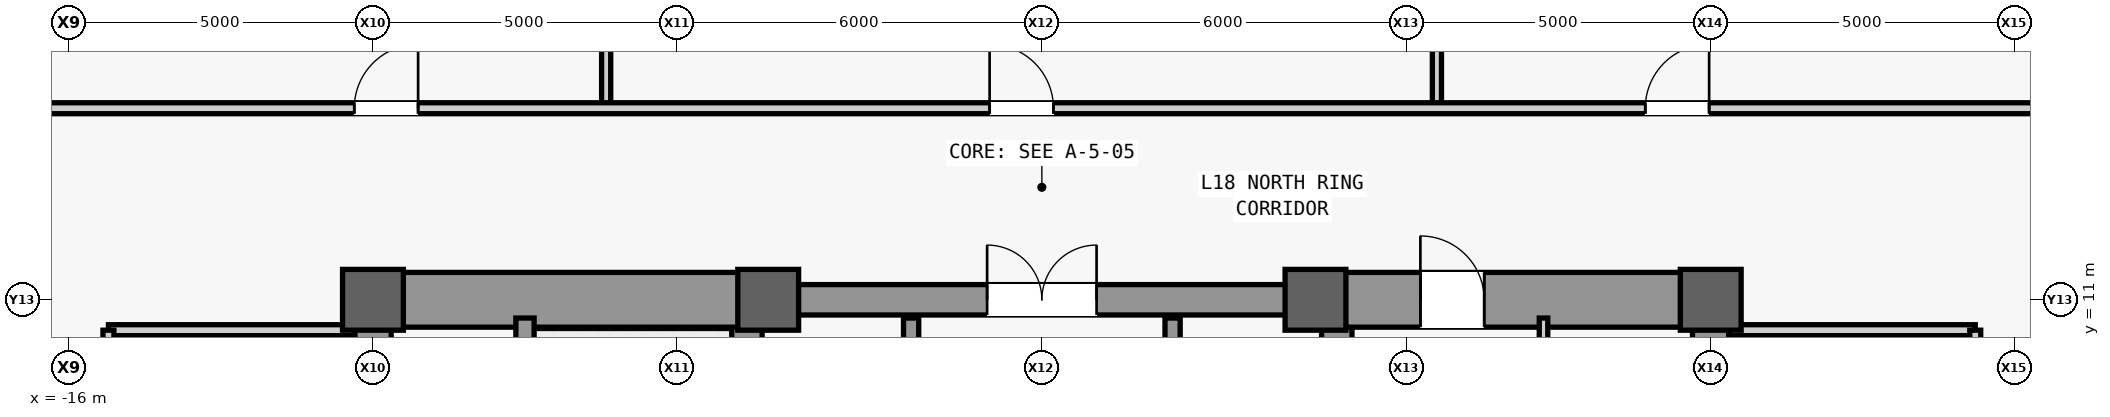
"""IFC4 building model, lengths in metres.
Left out: names, types, materials, properties, quantities, classifications, styles, units other than length and angle.
Written with IfcOpenShell. Run it as: python <this file> out.ifc"""

import sys

from ifc_helpers import new_model, si_unit, direction, frame, frame_2d, origin, origin_2d, place, context, subcontext, project, spatial, rectangle, extrude, source, transform, mapped, element, fill, save


model = new_model("IFC4")
c1 = context("Model", 3, precision=1e-05, world=origin(), true_north=direction((0.0, 1.0)))
c2 = subcontext(c1, "Body", "Model", "MODEL_VIEW")
j1 = project(units=[si_unit("LENGTHUNIT", "METRE"), si_unit("PLANEANGLEUNIT", "RADIAN")], contexts=[c1])
p1 = place(None, origin())
s1 = spatial("IfcSite", under=j1, at=p1, CompositionType="ELEMENT")
p2 = place(p1, origin())
s2 = spatial("IfcBuilding", under=s1, at=p2, CompositionType="ELEMENT")
p3 = place(p2, frame((0.0, 0.0, 83.0)))
s3 = spatial("IfcBuildingStorey", under=s2, at=p3, CompositionType="ELEMENT", Elevation=83.0)
m1 = source(origin(), c2, "Body", "SweptSolid", [
    extrude(rectangle(XDim=22.0, YDim=0.6, at=frame_2d((11.0, 0.0))), origin(), (0.0, 0.0, 1.0), 3.94),
])
p4 = place(p3, frame((-11.0, -11.0, 0.0), z_axis=(0.0, 0.0, 1.0), x_axis=(0.0, 1.0, 0.0)))
e1 = element("IfcWall", 1, at=p4, inside=s3, PredefinedType="SHEAR", context=c2, shape_type="MappedRepresentation", body=[
    mapped(m1, transform((0.0, 0.0, 0.0), scale=1.0)),
])
m2 = source(origin(), c2, "Body", "SweptSolid", [
    extrude(rectangle(XDim=1.1, YDim=2.2, at=frame_2d((0.55, 1.1))), frame((0.0, 0.31, 0.0), z_axis=(0.0, -1.0, 0.0), x_axis=(1.0, 0.0, 0.0)), (0.0, 0.0, 1.0), 0.62),
])
p5 = place(p4, frame((0.8, 0.0, 0.0)))
e2 = element("IfcOpeningElement", 2, at=p5, cuts=e1, PredefinedType="OPENING", context=c2, shape_type="MappedRepresentation", body=[
    mapped(m2, transform((0.0, 0.0, 0.0), scale=1.0)),
])
p6 = place(p4, frame((12.5, 0.0, 0.0)))
e3 = element("IfcOpeningElement", 3, at=p6, cuts=e1, PredefinedType="OPENING", context=c2, shape_type="MappedRepresentation", body=[
    mapped(m2, transform((0.0, 0.0, 0.0), scale=1.0)),
])
m3 = source(origin(), c2, "Body", "SweptSolid", [
    extrude(rectangle(XDim=0.9, YDim=2.15, at=frame_2d((0.45, 1.075))), frame((0.0, 0.31, 0.0), z_axis=(0.0, -1.0, 0.0), x_axis=(1.0, 0.0, 0.0)), (0.0, 0.0, 1.0), 0.62),
])
p7 = place(p4, frame((6.85, 0.0, 0.0)))
e4 = element("IfcOpeningElement", 4, at=p7, cuts=e1, PredefinedType="OPENING", context=c2, shape_type="MappedRepresentation", body=[
    mapped(m3, transform((0.0, 0.0, 0.0), scale=1.0)),
])
m4 = source(origin(), c2, "Body", "SweptSolid", [
    extrude(rectangle(XDim=1.3, YDim=2.3, at=frame_2d((0.65, 1.15))), frame((0.0, 0.31, 0.0), z_axis=(0.0, -1.0, 0.0), x_axis=(1.0, 0.0, 0.0)), (0.0, 0.0, 1.0), 0.62),
])
p8 = place(p4, frame((2.7, 0.0, 0.0)))
e5 = element("IfcOpeningElement", 5, at=p8, cuts=e1, PredefinedType="OPENING", context=c2, shape_type="MappedRepresentation", body=[
    mapped(m4, transform((0.0, 0.0, 0.0), scale=1.0)),
])
p9 = place(p3, frame((11.0, -11.0, 0.0), z_axis=(0.0, 0.0, 1.0), x_axis=(0.0, 1.0, 0.0)))
e6 = element("IfcWall", 6, at=p9, inside=s3, PredefinedType="SHEAR", context=c2, shape_type="MappedRepresentation", body=[
    mapped(m1, transform((0.0, 0.0, 0.0), scale=1.0)),
])
p10 = place(p9, frame((0.8, 0.0, 0.0)))
e7 = element("IfcOpeningElement", 7, at=p10, cuts=e6, PredefinedType="OPENING", context=c2, shape_type="MappedRepresentation", body=[
    mapped(m2, transform((0.0, 0.0, 0.0), scale=1.0)),
])
p11 = place(p9, frame((6.2, 0.0, 0.0)))
e8 = element("IfcOpeningElement", 8, at=p11, cuts=e6, PredefinedType="OPENING", context=c2, shape_type="MappedRepresentation", body=[
    mapped(m3, transform((0.0, 0.0, 0.0), scale=1.0)),
])
p12 = place(p9, frame((8.05, 0.0, 0.0)))
e9 = element("IfcOpeningElement", 9, at=p12, cuts=e6, PredefinedType="OPENING", context=c2, shape_type="MappedRepresentation", body=[
    mapped(m3, transform((0.0, 0.0, 0.0), scale=1.0)),
])
p13 = place(p9, frame((2.7, 0.0, 0.0)))
e10 = element("IfcOpeningElement", 10, at=p13, cuts=e6, PredefinedType="OPENING", context=c2, shape_type="MappedRepresentation", body=[
    mapped(m4, transform((0.0, 0.0, 0.0), scale=1.0)),
])
p14 = place(p9, frame((13.35, 0.0, 0.0)))
e11 = element("IfcOpeningElement", 11, at=p14, cuts=e6, PredefinedType="OPENING", context=c2, shape_type="MappedRepresentation", body=[
    mapped(m4, transform((0.0, 0.0, 0.0), scale=1.0)),
])
m5 = source(origin(), c2, "Body", "SweptSolid", [
    extrude(rectangle(XDim=21.4, YDim=0.5, at=frame_2d((10.7, 0.0))), origin(), (0.0, 0.0, 1.0), 3.94),
])
for number, where, z_axis, x_axis in (
    (12, (-4.85, -10.7, 0.0), (0.0, 0.0, 1.0), (0.0, 1.0, 0.0)),
    (13, (4.85, -10.7, 0.0), (0.0, 0.0, 1.0), (0.0, 1.0, 0.0)),
):
    element("IfcWall", number, at=place(p3, frame(where, z_axis=z_axis, x_axis=x_axis)), inside=s3, PredefinedType="SHEAR", context=c2, shape_type="MappedRepresentation", body=[
        mapped(m5, transform((0.0, 0.0, 0.0), scale=1.0)),
    ])
m6 = source(origin(), c2, "Body", "SweptSolid", [
    extrude(rectangle(XDim=5.85, YDim=0.9, at=frame_2d((2.925, 0.0))), origin(), (0.0, 0.0, 1.0), 3.94),
])
p15 = place(p3, frame((-10.7, 11.0, 0.0), z_axis=(0.0, 0.0, 1.0), x_axis=(1.0, 0.0, 0.0)))
e14 = element("IfcWall", 14, at=p15, inside=s3, PredefinedType="SHEAR", context=c2, shape_type="MappedRepresentation", body=[
    mapped(m6, transform((0.0, 0.0, 0.0), scale=1.0)),
])
p16 = place(p3, frame((4.85, 11.0, 0.0), z_axis=(0.0, 0.0, 1.0), x_axis=(1.0, 0.0, 0.0)))
e15 = element("IfcWall", 15, at=p16, inside=s3, PredefinedType="SHEAR", context=c2, shape_type="MappedRepresentation", body=[
    mapped(m6, transform((0.0, 0.0, 0.0), scale=1.0)),
])
m7 = source(origin(), c2, "Body", "SweptSolid", [
    extrude(rectangle(XDim=1.05, YDim=2.2, at=frame_2d((0.525, 1.1))), frame((0.0, 0.46, 0.0), z_axis=(0.0, -1.0, 0.0), x_axis=(1.0, 0.0, 0.0)), (0.0, 0.0, 1.0), 0.92),
])
p17 = place(p16, frame((1.375, 0.0, 0.0)))
e16 = element("IfcOpeningElement", 16, at=p17, cuts=e15, PredefinedType="OPENING", context=c2, shape_type="MappedRepresentation", body=[
    mapped(m7, transform((0.0, 0.0, 0.0), scale=1.0)),
])
m8 = source(origin(), c2, "Body", "SweptSolid", [
    extrude(rectangle(XDim=9.2, YDim=0.5, at=frame_2d((4.6, 0.0))), origin(), (0.0, 0.0, 1.0), 3.94),
])
p18 = place(p3, frame((-4.6, 11.0, 0.0), z_axis=(0.0, 0.0, 1.0), x_axis=(1.0, 0.0, 0.0)))
e17 = element("IfcWall", 17, at=p18, inside=s3, PredefinedType="SHEAR", context=c2, shape_type="MappedRepresentation", body=[
    mapped(m8, transform((0.0, 0.0, 0.0), scale=1.0)),
])
m9 = source(origin(), c2, "Body", "SweptSolid", [
    extrude(rectangle(XDim=1.8, YDim=2.25, at=frame_2d((0.9, 1.125))), frame((0.0, 0.26, 0.0), z_axis=(0.0, -1.0, 0.0), x_axis=(1.0, 0.0, 0.0)), (0.0, 0.0, 1.0), 0.52),
])
p19 = place(p18, frame((3.7, 0.0, 0.0)))
e18 = element("IfcOpeningElement", 18, at=p19, cuts=e17, PredefinedType="OPENING", context=c2, shape_type="MappedRepresentation", body=[
    mapped(m9, transform((0.0, 0.0, 0.0), scale=1.0)),
])
m10 = source(origin(), c2, "Body", "SweptSolid", [
    extrude(rectangle(XDim=1.0, YDim=1.0, at=origin_2d()), origin(), (0.0, 0.0, 1.0), 4.2),
])
for number, where, z_axis, x_axis in (
    (19, (-11.0, 11.0, 0.0), (0.0, 0.0, 1.0), (1.0, 0.0, 0.0)),
    (20, (-4.5, 11.0, 0.0), (0.0, 0.0, 1.0), (1.0, 0.0, 0.0)),
    (21, (4.5, 11.0, 0.0), (0.0, 0.0, 1.0), (1.0, 0.0, 0.0)),
    (22, (11.0, 11.0, 0.0), (0.0, 0.0, 1.0), (1.0, 0.0, 0.0)),
):
    element("IfcColumn", number, at=place(p3, frame(where, z_axis=z_axis, x_axis=x_axis)), inside=s3, PredefinedType="COLUMN", context=c2, shape_type="MappedRepresentation", body=[
        mapped(m10, transform((0.0, 0.0, 0.0), scale=1.0)),
    ])
m11 = source(origin(), c2, "Body", "SweptSolid", [
    extrude(rectangle(XDim=7.75, YDim=0.3, at=frame_2d((3.875, 0.0))), origin(), (0.0, 0.0, 1.0), 3.94),
])
p20 = place(p3, frame((-8.5, 2.95, 0.0), z_axis=(0.0, 0.0, 1.0), x_axis=(0.0, 1.0, 0.0)))
e23 = element("IfcWall", 23, at=p20, inside=s3, PredefinedType="SHEAR", context=c2, shape_type="MappedRepresentation", body=[
    mapped(m11, transform((0.0, 0.0, 0.0), scale=1.0)),
])
m12 = source(origin(), c2, "Body", "SweptSolid", [
    extrude(rectangle(XDim=9.4, YDim=0.14, at=frame_2d((4.7, 0.0))), origin(), (0.0, 0.0, 1.0), 3.94),
])
p21 = place(p3, frame((8.25, 1.3, 0.0), z_axis=(0.0, 0.0, 1.0), x_axis=(0.0, 1.0, 0.0)))
e24 = element("IfcWall", 24, at=p21, inside=s3, PredefinedType="PARTITIONING", context=c2, shape_type="MappedRepresentation", body=[
    mapped(m12, transform((0.0, 0.0, 0.0), scale=1.0)),
])
m13 = source(origin(), c2, "Body", "SweptSolid", [
    extrude(rectangle(XDim=4.05, YDim=0.18, at=frame_2d((2.025, 0.0))), origin(), (0.0, 0.0, 1.0), 3.94),
])
p22 = place(p3, frame((-15.35, 10.5, 0.0), z_axis=(0.0, 0.0, 1.0), x_axis=(1.0, 0.0, 0.0)))
e25 = element("IfcWall", 25, at=p22, inside=s3, PredefinedType="PARTITIONING", context=c2, shape_type="MappedRepresentation", body=[
    mapped(m13, transform((0.0, 0.0, 0.0), scale=1.0)),
])
m14 = source(origin(), c2, "Body", "SweptSolid", [
    extrude(rectangle(XDim=16.6, YDim=0.18, at=frame_2d((8.3, 0.0))), origin(), (0.0, 0.0, 1.0), 3.94),
])
p23 = place(p3, frame((-15.35, -6.1, 0.0), z_axis=(0.0, 0.0, 1.0), x_axis=(0.0, 1.0, 0.0)))
e26 = element("IfcWall", 26, at=p23, inside=s3, PredefinedType="PARTITIONING", context=c2, shape_type="MappedRepresentation", body=[
    mapped(m14, transform((0.0, 0.0, 0.0), scale=1.0)),
])
m15 = source(origin(), c2, "Body", "SweptSolid", [
    extrude(rectangle(XDim=1.8, YDim=2.25, at=frame_2d((0.9, 1.125))), frame((0.0, 0.1, 0.0), z_axis=(0.0, -1.0, 0.0), x_axis=(1.0, 0.0, 0.0)), (0.0, 0.0, 1.0), 0.2),
])
p24 = place(p23, frame((2.7, 0.0, 0.0)))
e27 = element("IfcOpeningElement", 27, at=p24, cuts=e26, PredefinedType="OPENING", context=c2, shape_type="MappedRepresentation", body=[
    mapped(m15, transform((0.0, 0.0, 0.0), scale=1.0)),
])
p25 = place(p23, frame((11.0, 0.0, 0.0)))
e28 = element("IfcOpeningElement", 28, at=p25, cuts=e26, PredefinedType="OPENING", context=c2, shape_type="MappedRepresentation", body=[
    mapped(m15, transform((0.0, 0.0, 0.0), scale=1.0)),
])
p26 = place(p3, frame((11.3, 10.5, 0.0), z_axis=(0.0, 0.0, 1.0), x_axis=(1.0, 0.0, 0.0)))
e29 = element("IfcWall", 29, at=p26, inside=s3, PredefinedType="PARTITIONING", context=c2, shape_type="MappedRepresentation", body=[
    mapped(m13, transform((0.0, 0.0, 0.0), scale=1.0)),
])
p27 = place(p3, frame((15.35, -6.1, 0.0), z_axis=(0.0, 0.0, 1.0), x_axis=(0.0, 1.0, 0.0)))
e30 = element("IfcWall", 30, at=p27, inside=s3, PredefinedType="PARTITIONING", context=c2, shape_type="MappedRepresentation", body=[
    mapped(m14, transform((0.0, 0.0, 0.0), scale=1.0)),
])
p28 = place(p27, frame((2.7, 0.0, 0.0)))
e31 = element("IfcOpeningElement", 31, at=p28, cuts=e30, PredefinedType="OPENING", context=c2, shape_type="MappedRepresentation", body=[
    mapped(m15, transform((0.0, 0.0, 0.0), scale=1.0)),
])
p29 = place(p27, frame((13.0, 0.0, 0.0)))
e32 = element("IfcOpeningElement", 32, at=p29, cuts=e30, PredefinedType="OPENING", context=c2, shape_type="MappedRepresentation", body=[
    mapped(m15, transform((0.0, 0.0, 0.0), scale=1.0)),
])
m16 = source(origin(), c2, "Body", "SweptSolid", [
    extrude(rectangle(XDim=5.4, YDim=0.25, at=frame_2d((2.7, 0.0))), origin(), (0.0, 0.0, 1.0), 3.94),
])
for number, where, z_axis, x_axis in (
    (33, (-2.15, 5.3, 0.0), (0.0, 0.0, 1.0), (0.0, 1.0, 0.0)),
    (34, (2.15, 5.3, 0.0), (0.0, 0.0, 1.0), (0.0, 1.0, 0.0)),
):
    element("IfcWall", number, at=place(p3, frame(where, z_axis=z_axis, x_axis=x_axis)), inside=s3, PredefinedType="SHEAR", context=c2, shape_type="MappedRepresentation", body=[
        mapped(m16, transform((0.0, 0.0, 0.0), scale=1.0)),
    ])
m17 = source(origin(), c2, "Body", "SweptSolid", [
    extrude(rectangle(XDim=17.85, YDim=0.15, at=frame_2d((8.925, 0.0))), origin(), (0.0, 0.0, 1.0), 3.94),
])
for number, where, z_axis, x_axis in (
    (35, (-7.165, 14.15, 0.0), (0.0, 0.0, 1.0), (0.0, 1.0, 0.0)),
    (36, (6.497, 14.15, 0.0), (0.0, 0.0, 1.0), (0.0, 1.0, 0.0)),
):
    element("IfcWall", number, at=place(p3, frame(where, z_axis=z_axis, x_axis=x_axis)), inside=s3, PredefinedType="PARTITIONING", context=c2, shape_type="MappedRepresentation", body=[
        mapped(m17, transform((0.0, 0.0, 0.0), scale=1.0)),
    ])
m18 = source(origin(), c2, "Body", "SweptSolid", [
    extrude(rectangle(XDim=37.95, YDim=0.18, at=frame_2d((18.975, 0.0))), origin(), (0.0, 0.0, 1.0), 3.94),
])
p30 = place(p3, frame((-18.55, 14.15, 0.0), z_axis=(0.0, 0.0, 1.0), x_axis=(1.0, 0.0, 0.0)))
e37 = element("IfcWall", 37, at=p30, inside=s3, PredefinedType="PARTITIONING", context=c2, shape_type="MappedRepresentation", body=[
    mapped(m18, transform((0.0, 0.0, 0.0), scale=1.0)),
])
m19 = source(origin(), c2, "Body", "SweptSolid", [
    extrude(rectangle(XDim=1.05, YDim=2.2, at=frame_2d((0.525, 1.1))), frame((0.0, 0.1, 0.0), z_axis=(0.0, -1.0, 0.0), x_axis=(1.0, 0.0, 0.0)), (0.0, 0.0, 1.0), 0.2),
])
p31 = place(p30, frame((7.242, 0.0, 0.0)))
e38 = element("IfcOpeningElement", 38, at=p31, cuts=e37, PredefinedType="OPENING", context=c2, shape_type="MappedRepresentation", body=[
    mapped(m19, transform((0.0, 0.0, 0.0), scale=1.0)),
])
p32 = place(p30, frame((17.691, 0.0, 0.0)))
e39 = element("IfcOpeningElement", 39, at=p32, cuts=e37, PredefinedType="OPENING", context=c2, shape_type="MappedRepresentation", body=[
    mapped(m19, transform((0.0, 0.0, 0.0), scale=1.0)),
])
p33 = place(p30, frame((28.473, 0.0, 0.0)))
e40 = element("IfcOpeningElement", 40, at=p33, cuts=e37, PredefinedType="OPENING", context=c2, shape_type="MappedRepresentation", body=[
    mapped(m19, transform((0.0, 0.0, 0.0), scale=1.0)),
])
m20 = source(origin(), c2, "Body", "SweptSolid", [
    extrude(rectangle(XDim=1.05, YDim=2.2, at=frame_2d((0.525, 1.1))), frame((0.0, 0.025, 0.0), z_axis=(0.0, -1.0, 0.0), x_axis=(1.0, 0.0, 0.0)), (0.0, 0.0, 1.0), 0.05),
])
p34 = place(p17, origin())
e41 = element("IfcDoor", 41, at=p34, inside=s3, OperationType="SINGLE_SWING_LEFT", PredefinedType="DOOR", context=c2, shape_type="MappedRepresentation", body=[
    mapped(m20, transform((0.0, 0.0, 0.0), scale=1.0)),
])
fill(e16, e41)
m21 = source(origin(), c2, "Body", "SweptSolid", [
    extrude(rectangle(XDim=1.8, YDim=2.25, at=frame_2d((0.9, 1.125))), frame((0.0, 0.025, 0.0), z_axis=(0.0, -1.0, 0.0), x_axis=(1.0, 0.0, 0.0)), (0.0, 0.0, 1.0), 0.05),
])
p35 = place(p19, origin())
e42 = element("IfcDoor", 42, at=p35, inside=s3, OperationType="SINGLE_SWING_RIGHT", PredefinedType="DOOR", context=c2, shape_type="MappedRepresentation", body=[
    mapped(m21, transform((0.0, 0.0, 0.0), scale=1.0)),
])
fill(e18, e42)
p36 = place(p31, origin())
e43 = element("IfcDoor", 43, at=p36, inside=s3, OperationType="SINGLE_SWING_RIGHT", PredefinedType="DOOR", context=c2, shape_type="MappedRepresentation", body=[
    mapped(m20, transform((0.0, 0.0, 0.0), scale=1.0)),
])
fill(e38, e43)
p37 = place(p32, origin())
e44 = element("IfcDoor", 44, at=p37, inside=s3, OperationType="SINGLE_SWING_LEFT", PredefinedType="DOOR", context=c2, shape_type="MappedRepresentation", body=[
    mapped(m20, transform((0.0, 0.0, 0.0), scale=1.0)),
])
fill(e39, e44)
p38 = place(p33, origin())
e45 = element("IfcDoor", 45, at=p38, inside=s3, OperationType="SINGLE_SWING_RIGHT", PredefinedType="DOOR", context=c2, shape_type="MappedRepresentation", body=[
    mapped(m20, transform((0.0, 0.0, 0.0), scale=1.0)),
])
fill(e40, e45)
save(model, sys.argv[1])
